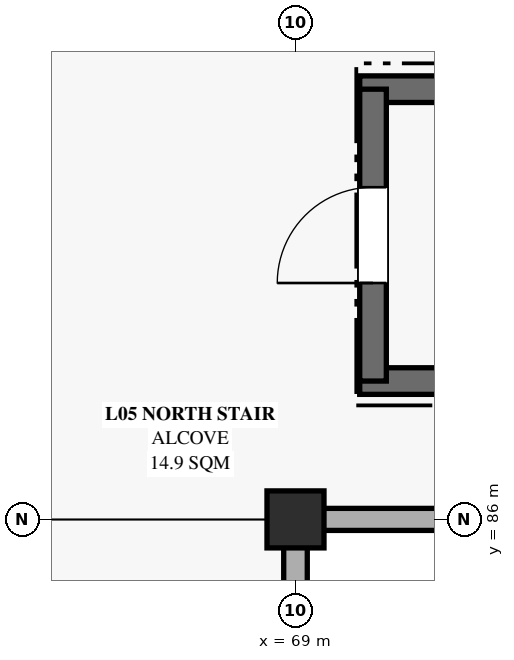
"""IFC4 building model, lengths in metres.
Left out: names, types, materials, properties, quantities, classifications, styles, units other than length and angle.
Written with IfcOpenShell. Run it as: python <this file> out.ifc"""

import sys

from ifc_helpers import new_model, si_unit, direction, frame, frame_2d, origin, origin_2d, place, context, subcontext, project, spatial, rectangle, extrude, element, fill, save


model = new_model("IFC4")
c1 = context("Model", 3, precision=1e-05, world=origin(), true_north=direction((0.0, 1.0)))
c2 = subcontext(c1, "Body", "Model", "MODEL_VIEW")
j1 = project(units=[si_unit("LENGTHUNIT", "METRE"), si_unit("PLANEANGLEUNIT", "RADIAN")], contexts=[c1])
p1 = place(None, origin())
s1 = spatial("IfcSite", under=j1, at=p1, CompositionType="ELEMENT")
p2 = place(p1, origin())
s2 = spatial("IfcBuilding", under=s1, at=p2, CompositionType="ELEMENT")
p3 = place(p2, frame((0.0, 0.0, 24.3)))
s3 = spatial("IfcBuildingStorey", under=s2, at=p3, CompositionType="ELEMENT", Elevation=24.3)
p4 = place(p3, frame((69.0, 86.0, 0.0), z_axis=(0.0, 0.0, 1.0), x_axis=(1.0, 0.0, 0.0)))
e1 = element("IfcColumn", 1, at=p4, inside=s3, PredefinedType="COLUMN", context=c2, shape_type="SweptSolid", body=[
    extrude(rectangle(XDim=0.75, YDim=0.75, at=origin_2d()), origin(), (0.0, 0.0, 1.0), 4.5),
])
p5 = place(p3, frame((69.0, 85.64, 0.0), z_axis=(0.0, 0.0, 1.0), x_axis=(0.0, -1.0, 0.0)))
e2 = element("IfcWall", 2, at=p5, inside=s3, PredefinedType="SOLIDWALL", context=c2, shape_type="SweptSolid", body=[
    extrude(rectangle(XDim=6.48, YDim=0.31, at=frame_2d((3.24, 0.0))), origin(), (0.0, 0.0, 1.0), 3.0),
])
p6 = place(p5, frame((2.39, 0.0, 0.85)))
e3 = element("IfcOpeningElement", 3, at=p6, cuts=e2, PredefinedType="OPENING", context=c2, shape_type="SweptSolid", body=[
    extrude(rectangle(XDim=1.7, YDim=2.0, at=frame_2d((0.85, 1.0))), frame((0.0, 0.165, 0.0), z_axis=(0.0, -1.0, 0.0), x_axis=(1.0, 0.0, 0.0)), (0.0, 0.0, 1.0), 0.33),
])
p7 = place(p3, frame((75.84, 86.0, 0.0), z_axis=(0.0, 0.0, 1.0), x_axis=(-1.0, 0.0, 0.0)))
e4 = element("IfcWall", 4, at=p7, inside=s3, PredefinedType="SOLIDWALL", context=c2, shape_type="SweptSolid", body=[
    extrude(rectangle(XDim=6.48, YDim=0.29, at=frame_2d((3.24, 0.0))), origin(), (0.0, 0.0, 1.0), 3.0),
])
p8 = place(p7, frame((2.59, 0.0, 0.85)))
e5 = element("IfcOpeningElement", 5, at=p8, cuts=e4, PredefinedType="OPENING", context=c2, shape_type="SweptSolid", body=[
    extrude(rectangle(XDim=1.3, YDim=1.9, at=frame_2d((0.65, 0.95))), frame((0.0, 0.155, 0.0), z_axis=(0.0, -1.0, 0.0), x_axis=(1.0, 0.0, 0.0)), (0.0, 0.0, 1.0), 0.31),
])
for number, where, z_axis, x_axis in (
    (6, (77.855, 87.82, 0.0), (0.0, 0.0, 1.0), (-1.0, 0.0, 0.0)),
    (7, (69.845, 91.66, 0.0), (0.0, 0.0, 1.0), (1.0, 0.0, 0.0)),
):
    element("IfcWall", number, at=place(p3, frame(where, z_axis=z_axis, x_axis=x_axis)), inside=s3, PredefinedType="SHEAR", context=c2, shape_type="SweptSolid", body=[
        extrude(rectangle(XDim=8.01, YDim=0.35, at=frame_2d((4.005, 0.0))), origin(), (0.0, 0.0, 1.0), 4.23),
    ])
p9 = place(p3, frame((70.02, 87.82, 0.0), z_axis=(0.0, 0.0, 1.0), x_axis=(0.0, 1.0, 0.0)))
e8 = element("IfcWall", 8, at=p9, inside=s3, PredefinedType="SHEAR", context=c2, shape_type="SweptSolid", body=[
    extrude(rectangle(XDim=3.84, YDim=0.35, at=frame_2d((1.92, 0.0))), origin(), (0.0, 0.0, 1.0), 4.23),
])
p10 = place(p9, frame((1.29, 0.0, 0.0)))
e9 = element("IfcOpeningElement", 9, at=p10, cuts=e8, PredefinedType="OPENING", context=c2, shape_type="SweptSolid", body=[
    extrude(rectangle(XDim=1.26, YDim=2.18, at=frame_2d((0.63, 1.09))), frame((0.0, 0.185, 0.0), z_axis=(0.0, -1.0, 0.0), x_axis=(1.0, 0.0, 0.0)), (0.0, 0.0, 1.0), 0.37),
])
p11 = place(p10, origin())
e10 = element("IfcDoor", 10, at=p11, inside=s3, OperationType="SINGLE_SWING_LEFT", PredefinedType="DOOR", context=c2, shape_type="SweptSolid", body=[
    extrude(rectangle(XDim=1.26, YDim=2.18, at=frame_2d((0.63, 1.09))), frame((0.0, 0.025, 0.0), z_axis=(0.0, -1.0, 0.0), x_axis=(1.0, 0.0, 0.0)), (0.0, 0.0, 1.0), 0.05),
])
fill(e9, e10)
save(model, sys.argv[1])
